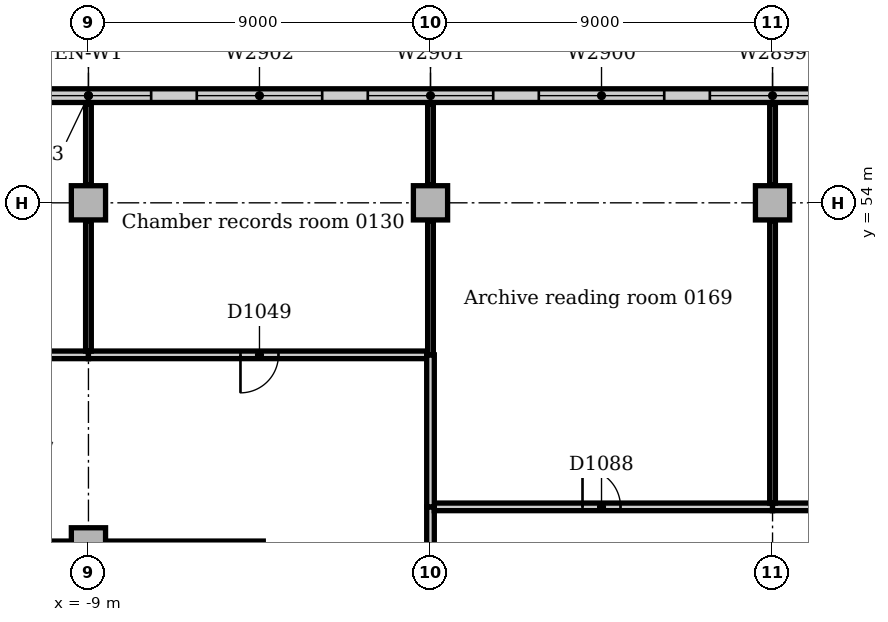
"""IFC4 building model, lengths in metres.
Left out: names, types, materials, properties, quantities, classifications, styles, units other than length and angle.
Written with IfcOpenShell. Run it as: python <this file> out.ifc"""

import sys

from ifc_helpers import new_model, si_unit, direction, frame, frame_2d, origin, origin_2d, place, context, subcontext, project, spatial, rectangle, extrude, element, fill, save


model = new_model("IFC4")
c1 = context("Model", 3, precision=1e-05, world=origin(), true_north=direction((0.0, 1.0)))
c2 = subcontext(c1, "Body", "Model", "MODEL_VIEW")
j1 = project(units=[si_unit("LENGTHUNIT", "METRE"), si_unit("PLANEANGLEUNIT", "RADIAN")], contexts=[c1])
p1 = place(None, origin())
s1 = spatial("IfcSite", under=j1, at=p1, CompositionType="ELEMENT")
p2 = place(p1, origin())
s2 = spatial("IfcBuilding", under=s1, at=p2, CompositionType="ELEMENT")
p3 = place(p2, frame((0.0, 0.0, 6.0)))
s3 = spatial("IfcBuildingStorey", under=s2, at=p3, CompositionType="ELEMENT", Elevation=6.0)
for number, where, z_axis, x_axis in (
    (1, (-9.0, 45.0, 0.0), (0.0, 0.0, 1.0), (1.0, 0.0, 0.0)),
    (2, (-9.0, 54.0, 0.0), (0.0, 0.0, 1.0), (1.0, 0.0, 0.0)),
    (3, (0.0, 54.0, 0.0), (0.0, 0.0, 1.0), (1.0, 0.0, 0.0)),
    (4, (9.0, 54.0, 0.0), (0.0, 0.0, 1.0), (1.0, 0.0, 0.0)),
):
    element("IfcColumn", number, at=place(p3, frame(where, z_axis=z_axis, x_axis=x_axis)), inside=s3, PredefinedType="COLUMN", context=c2, shape_type="SweptSolid", body=[
        extrude(rectangle(XDim=0.9, YDim=0.9, at=origin_2d()), origin(), (0.0, 0.0, 1.0), 4.7),
    ])
p4 = place(p3, frame((63.0, 56.82, 0.0), z_axis=(0.0, 0.0, 1.0), x_axis=(-1.0, 0.0, 0.0)))
e5 = element("IfcWall", 5, at=p4, inside=s3, PredefinedType="STANDARD", context=c2, shape_type="SweptSolid", body=[
    extrude(rectangle(XDim=144.0, YDim=0.36, at=frame_2d((72.0, 0.0))), origin(), (0.0, 0.0, 1.0), 4.7),
])
p5 = place(p4, frame((2.85, 0.0, 0.9)))
e6 = element("IfcOpeningElement", 6, at=p5, cuts=e5, PredefinedType="OPENING", context=c2, shape_type="SweptSolid", body=[
    extrude(rectangle(XDim=3.3, YDim=2.4, at=frame_2d((1.65, 1.2))), frame((0.0, 0.19, 0.0), z_axis=(0.0, -1.0, 0.0), x_axis=(1.0, 0.0, 0.0)), (0.0, 0.0, 1.0), 0.38),
])
p6 = place(p4, frame((7.35, 0.0, 0.9)))
e7 = element("IfcOpeningElement", 7, at=p6, cuts=e5, PredefinedType="OPENING", context=c2, shape_type="SweptSolid", body=[
    extrude(rectangle(XDim=3.3, YDim=2.4, at=frame_2d((1.65, 1.2))), frame((0.0, 0.19, 0.0), z_axis=(0.0, -1.0, 0.0), x_axis=(1.0, 0.0, 0.0)), (0.0, 0.0, 1.0), 0.38),
])
p7 = place(p4, frame((11.85, 0.0, 0.9)))
e8 = element("IfcOpeningElement", 8, at=p7, cuts=e5, PredefinedType="OPENING", context=c2, shape_type="SweptSolid", body=[
    extrude(rectangle(XDim=3.3, YDim=2.4, at=frame_2d((1.65, 1.2))), frame((0.0, 0.19, 0.0), z_axis=(0.0, -1.0, 0.0), x_axis=(1.0, 0.0, 0.0)), (0.0, 0.0, 1.0), 0.38),
])
p8 = place(p4, frame((16.35, 0.0, 0.9)))
e9 = element("IfcOpeningElement", 9, at=p8, cuts=e5, PredefinedType="OPENING", context=c2, shape_type="SweptSolid", body=[
    extrude(rectangle(XDim=3.3, YDim=2.4, at=frame_2d((1.65, 1.2))), frame((0.0, 0.19, 0.0), z_axis=(0.0, -1.0, 0.0), x_axis=(1.0, 0.0, 0.0)), (0.0, 0.0, 1.0), 0.38),
])
p9 = place(p4, frame((20.85, 0.0, 0.9)))
e10 = element("IfcOpeningElement", 10, at=p9, cuts=e5, PredefinedType="OPENING", context=c2, shape_type="SweptSolid", body=[
    extrude(rectangle(XDim=3.3, YDim=2.4, at=frame_2d((1.65, 1.2))), frame((0.0, 0.19, 0.0), z_axis=(0.0, -1.0, 0.0), x_axis=(1.0, 0.0, 0.0)), (0.0, 0.0, 1.0), 0.38),
])
p10 = place(p4, frame((25.35, 0.0, 0.9)))
e11 = element("IfcOpeningElement", 11, at=p10, cuts=e5, PredefinedType="OPENING", context=c2, shape_type="SweptSolid", body=[
    extrude(rectangle(XDim=3.3, YDim=2.4, at=frame_2d((1.65, 1.2))), frame((0.0, 0.19, 0.0), z_axis=(0.0, -1.0, 0.0), x_axis=(1.0, 0.0, 0.0)), (0.0, 0.0, 1.0), 0.38),
])
p11 = place(p4, frame((29.85, 0.0, 0.9)))
e12 = element("IfcOpeningElement", 12, at=p11, cuts=e5, PredefinedType="OPENING", context=c2, shape_type="SweptSolid", body=[
    extrude(rectangle(XDim=3.3, YDim=2.4, at=frame_2d((1.65, 1.2))), frame((0.0, 0.19, 0.0), z_axis=(0.0, -1.0, 0.0), x_axis=(1.0, 0.0, 0.0)), (0.0, 0.0, 1.0), 0.38),
])
p12 = place(p4, frame((34.35, 0.0, 0.9)))
e13 = element("IfcOpeningElement", 13, at=p12, cuts=e5, PredefinedType="OPENING", context=c2, shape_type="SweptSolid", body=[
    extrude(rectangle(XDim=3.3, YDim=2.4, at=frame_2d((1.65, 1.2))), frame((0.0, 0.19, 0.0), z_axis=(0.0, -1.0, 0.0), x_axis=(1.0, 0.0, 0.0)), (0.0, 0.0, 1.0), 0.38),
])
p13 = place(p4, frame((38.85, 0.0, 0.9)))
e14 = element("IfcOpeningElement", 14, at=p13, cuts=e5, PredefinedType="OPENING", context=c2, shape_type="SweptSolid", body=[
    extrude(rectangle(XDim=3.3, YDim=2.4, at=frame_2d((1.65, 1.2))), frame((0.0, 0.19, 0.0), z_axis=(0.0, -1.0, 0.0), x_axis=(1.0, 0.0, 0.0)), (0.0, 0.0, 1.0), 0.38),
])
p14 = place(p4, frame((43.35, 0.0, 0.9)))
e15 = element("IfcOpeningElement", 15, at=p14, cuts=e5, PredefinedType="OPENING", context=c2, shape_type="SweptSolid", body=[
    extrude(rectangle(XDim=3.3, YDim=2.4, at=frame_2d((1.65, 1.2))), frame((0.0, 0.19, 0.0), z_axis=(0.0, -1.0, 0.0), x_axis=(1.0, 0.0, 0.0)), (0.0, 0.0, 1.0), 0.38),
])
p15 = place(p4, frame((47.85, 0.0, 0.9)))
e16 = element("IfcOpeningElement", 16, at=p15, cuts=e5, PredefinedType="OPENING", context=c2, shape_type="SweptSolid", body=[
    extrude(rectangle(XDim=3.3, YDim=2.4, at=frame_2d((1.65, 1.2))), frame((0.0, 0.19, 0.0), z_axis=(0.0, -1.0, 0.0), x_axis=(1.0, 0.0, 0.0)), (0.0, 0.0, 1.0), 0.38),
])
p16 = place(p4, frame((52.35, 0.0, 0.9)))
e17 = element("IfcOpeningElement", 17, at=p16, cuts=e5, PredefinedType="OPENING", context=c2, shape_type="SweptSolid", body=[
    extrude(rectangle(XDim=3.3, YDim=2.4, at=frame_2d((1.65, 1.2))), frame((0.0, 0.19, 0.0), z_axis=(0.0, -1.0, 0.0), x_axis=(1.0, 0.0, 0.0)), (0.0, 0.0, 1.0), 0.38),
])
p17 = place(p4, frame((56.85, 0.0, 0.9)))
e18 = element("IfcOpeningElement", 18, at=p17, cuts=e5, PredefinedType="OPENING", context=c2, shape_type="SweptSolid", body=[
    extrude(rectangle(XDim=3.3, YDim=2.4, at=frame_2d((1.65, 1.2))), frame((0.0, 0.19, 0.0), z_axis=(0.0, -1.0, 0.0), x_axis=(1.0, 0.0, 0.0)), (0.0, 0.0, 1.0), 0.38),
])
p18 = place(p4, frame((61.35, 0.0, 0.9)))
e19 = element("IfcOpeningElement", 19, at=p18, cuts=e5, PredefinedType="OPENING", context=c2, shape_type="SweptSolid", body=[
    extrude(rectangle(XDim=3.3, YDim=2.4, at=frame_2d((1.65, 1.2))), frame((0.0, 0.19, 0.0), z_axis=(0.0, -1.0, 0.0), x_axis=(1.0, 0.0, 0.0)), (0.0, 0.0, 1.0), 0.38),
])
p19 = place(p4, frame((65.85, 0.0, 0.9)))
e20 = element("IfcOpeningElement", 20, at=p19, cuts=e5, PredefinedType="OPENING", context=c2, shape_type="SweptSolid", body=[
    extrude(rectangle(XDim=3.3, YDim=2.4, at=frame_2d((1.65, 1.2))), frame((0.0, 0.19, 0.0), z_axis=(0.0, -1.0, 0.0), x_axis=(1.0, 0.0, 0.0)), (0.0, 0.0, 1.0), 0.38),
])
p20 = place(p4, frame((70.35, 0.0, 0.9)))
e21 = element("IfcOpeningElement", 21, at=p20, cuts=e5, PredefinedType="OPENING", context=c2, shape_type="SweptSolid", body=[
    extrude(rectangle(XDim=3.3, YDim=2.4, at=frame_2d((1.65, 1.2))), frame((0.0, 0.19, 0.0), z_axis=(0.0, -1.0, 0.0), x_axis=(1.0, 0.0, 0.0)), (0.0, 0.0, 1.0), 0.38),
])
p21 = place(p4, frame((74.85, 0.0, 0.9)))
e22 = element("IfcOpeningElement", 22, at=p21, cuts=e5, PredefinedType="OPENING", context=c2, shape_type="SweptSolid", body=[
    extrude(rectangle(XDim=3.3, YDim=2.4, at=frame_2d((1.65, 1.2))), frame((0.0, 0.19, 0.0), z_axis=(0.0, -1.0, 0.0), x_axis=(1.0, 0.0, 0.0)), (0.0, 0.0, 1.0), 0.38),
])
p22 = place(p4, frame((79.35, 0.0, 0.9)))
e23 = element("IfcOpeningElement", 23, at=p22, cuts=e5, PredefinedType="OPENING", context=c2, shape_type="SweptSolid", body=[
    extrude(rectangle(XDim=3.3, YDim=2.4, at=frame_2d((1.65, 1.2))), frame((0.0, 0.19, 0.0), z_axis=(0.0, -1.0, 0.0), x_axis=(1.0, 0.0, 0.0)), (0.0, 0.0, 1.0), 0.38),
])
p23 = place(p4, frame((83.85, 0.0, 0.9)))
e24 = element("IfcOpeningElement", 24, at=p23, cuts=e5, PredefinedType="OPENING", context=c2, shape_type="SweptSolid", body=[
    extrude(rectangle(XDim=3.3, YDim=2.4, at=frame_2d((1.65, 1.2))), frame((0.0, 0.19, 0.0), z_axis=(0.0, -1.0, 0.0), x_axis=(1.0, 0.0, 0.0)), (0.0, 0.0, 1.0), 0.38),
])
p24 = place(p4, frame((88.35, 0.0, 0.9)))
e25 = element("IfcOpeningElement", 25, at=p24, cuts=e5, PredefinedType="OPENING", context=c2, shape_type="SweptSolid", body=[
    extrude(rectangle(XDim=3.3, YDim=2.4, at=frame_2d((1.65, 1.2))), frame((0.0, 0.19, 0.0), z_axis=(0.0, -1.0, 0.0), x_axis=(1.0, 0.0, 0.0)), (0.0, 0.0, 1.0), 0.38),
])
p25 = place(p4, frame((92.85, 0.0, 0.9)))
e26 = element("IfcOpeningElement", 26, at=p25, cuts=e5, PredefinedType="OPENING", context=c2, shape_type="SweptSolid", body=[
    extrude(rectangle(XDim=3.3, YDim=2.4, at=frame_2d((1.65, 1.2))), frame((0.0, 0.19, 0.0), z_axis=(0.0, -1.0, 0.0), x_axis=(1.0, 0.0, 0.0)), (0.0, 0.0, 1.0), 0.38),
])
p26 = place(p4, frame((97.35, 0.0, 0.9)))
e27 = element("IfcOpeningElement", 27, at=p26, cuts=e5, PredefinedType="OPENING", context=c2, shape_type="SweptSolid", body=[
    extrude(rectangle(XDim=3.3, YDim=2.4, at=frame_2d((1.65, 1.2))), frame((0.0, 0.19, 0.0), z_axis=(0.0, -1.0, 0.0), x_axis=(1.0, 0.0, 0.0)), (0.0, 0.0, 1.0), 0.38),
])
p27 = place(p4, frame((101.85, 0.0, 0.9)))
e28 = element("IfcOpeningElement", 28, at=p27, cuts=e5, PredefinedType="OPENING", context=c2, shape_type="SweptSolid", body=[
    extrude(rectangle(XDim=3.3, YDim=2.4, at=frame_2d((1.65, 1.2))), frame((0.0, 0.19, 0.0), z_axis=(0.0, -1.0, 0.0), x_axis=(1.0, 0.0, 0.0)), (0.0, 0.0, 1.0), 0.38),
])
p28 = place(p4, frame((106.35, 0.0, 0.9)))
e29 = element("IfcOpeningElement", 29, at=p28, cuts=e5, PredefinedType="OPENING", context=c2, shape_type="SweptSolid", body=[
    extrude(rectangle(XDim=3.3, YDim=2.4, at=frame_2d((1.65, 1.2))), frame((0.0, 0.19, 0.0), z_axis=(0.0, -1.0, 0.0), x_axis=(1.0, 0.0, 0.0)), (0.0, 0.0, 1.0), 0.38),
])
p29 = place(p4, frame((110.85, 0.0, 0.9)))
e30 = element("IfcOpeningElement", 30, at=p29, cuts=e5, PredefinedType="OPENING", context=c2, shape_type="SweptSolid", body=[
    extrude(rectangle(XDim=3.3, YDim=2.4, at=frame_2d((1.65, 1.2))), frame((0.0, 0.19, 0.0), z_axis=(0.0, -1.0, 0.0), x_axis=(1.0, 0.0, 0.0)), (0.0, 0.0, 1.0), 0.38),
])
p30 = place(p4, frame((115.35, 0.0, 0.9)))
e31 = element("IfcOpeningElement", 31, at=p30, cuts=e5, PredefinedType="OPENING", context=c2, shape_type="SweptSolid", body=[
    extrude(rectangle(XDim=3.3, YDim=2.4, at=frame_2d((1.65, 1.2))), frame((0.0, 0.19, 0.0), z_axis=(0.0, -1.0, 0.0), x_axis=(1.0, 0.0, 0.0)), (0.0, 0.0, 1.0), 0.38),
])
p31 = place(p4, frame((119.85, 0.0, 0.9)))
e32 = element("IfcOpeningElement", 32, at=p31, cuts=e5, PredefinedType="OPENING", context=c2, shape_type="SweptSolid", body=[
    extrude(rectangle(XDim=3.3, YDim=2.4, at=frame_2d((1.65, 1.2))), frame((0.0, 0.19, 0.0), z_axis=(0.0, -1.0, 0.0), x_axis=(1.0, 0.0, 0.0)), (0.0, 0.0, 1.0), 0.38),
])
p32 = place(p4, frame((124.35, 0.0, 0.9)))
e33 = element("IfcOpeningElement", 33, at=p32, cuts=e5, PredefinedType="OPENING", context=c2, shape_type="SweptSolid", body=[
    extrude(rectangle(XDim=3.3, YDim=2.4, at=frame_2d((1.65, 1.2))), frame((0.0, 0.19, 0.0), z_axis=(0.0, -1.0, 0.0), x_axis=(1.0, 0.0, 0.0)), (0.0, 0.0, 1.0), 0.38),
])
p33 = place(p4, frame((128.85, 0.0, 0.9)))
e34 = element("IfcOpeningElement", 34, at=p33, cuts=e5, PredefinedType="OPENING", context=c2, shape_type="SweptSolid", body=[
    extrude(rectangle(XDim=3.3, YDim=2.4, at=frame_2d((1.65, 1.2))), frame((0.0, 0.19, 0.0), z_axis=(0.0, -1.0, 0.0), x_axis=(1.0, 0.0, 0.0)), (0.0, 0.0, 1.0), 0.38),
])
p34 = place(p4, frame((133.35, 0.0, 0.9)))
e35 = element("IfcOpeningElement", 35, at=p34, cuts=e5, PredefinedType="OPENING", context=c2, shape_type="SweptSolid", body=[
    extrude(rectangle(XDim=3.3, YDim=2.4, at=frame_2d((1.65, 1.2))), frame((0.0, 0.19, 0.0), z_axis=(0.0, -1.0, 0.0), x_axis=(1.0, 0.0, 0.0)), (0.0, 0.0, 1.0), 0.38),
])
p35 = place(p4, frame((137.85, 0.0, 0.9)))
e36 = element("IfcOpeningElement", 36, at=p35, cuts=e5, PredefinedType="OPENING", context=c2, shape_type="SweptSolid", body=[
    extrude(rectangle(XDim=3.3, YDim=2.4, at=frame_2d((1.65, 1.2))), frame((0.0, 0.19, 0.0), z_axis=(0.0, -1.0, 0.0), x_axis=(1.0, 0.0, 0.0)), (0.0, 0.0, 1.0), 0.38),
])
p36 = place(p3, frame((0.0, 45.0, 0.0), z_axis=(0.0, 0.0, 1.0), x_axis=(0.0, 1.0, 0.0)))
e37 = element("IfcWall", 37, at=p36, inside=s3, PredefinedType="PARTITIONING", context=c2, shape_type="SweptSolid", body=[
    extrude(rectangle(XDim=1.0, YDim=0.2, at=frame_2d((0.5, 0.0))), origin(), (0.0, 0.0, 1.0), 4.7),
])
p37 = place(p3, frame((0.1, 46.0, 0.0), z_axis=(0.0, 0.0, 1.0), x_axis=(1.0, 0.0, 0.0)))
e38 = element("IfcWall", 38, at=p37, inside=s3, PredefinedType="PARTITIONING", context=c2, shape_type="SweptSolid", body=[
    extrude(rectangle(XDim=8.9, YDim=0.2, at=frame_2d((4.45, 0.0))), origin(), (0.0, 0.0, 1.0), 4.7),
])
p38 = place(p37, frame((3.9, 0.0, 0.0)))
e39 = element("IfcOpeningElement", 39, at=p38, cuts=e38, PredefinedType="OPENING", context=c2, shape_type="SweptSolid", body=[
    extrude(rectangle(XDim=1.0, YDim=2.1, at=frame_2d((0.5, 1.05))), frame((0.0, 0.11, 0.0), z_axis=(0.0, -1.0, 0.0), x_axis=(1.0, 0.0, 0.0)), (0.0, 0.0, 1.0), 0.22),
])
p39 = place(p3, frame((9.0, 46.0, 0.0), z_axis=(0.0, 0.0, 1.0), x_axis=(1.0, 0.0, 0.0)))
e40 = element("IfcWall", 40, at=p39, inside=s3, PredefinedType="PARTITIONING", context=c2, shape_type="SweptSolid", body=[
    extrude(rectangle(XDim=9.0, YDim=0.2, at=frame_2d((4.5, 0.0))), origin(), (0.0, 0.0, 1.0), 4.7),
])
p40 = place(p39, frame((4.0, 0.0, 0.0)))
e41 = element("IfcOpeningElement", 41, at=p40, cuts=e40, PredefinedType="OPENING", context=c2, shape_type="SweptSolid", body=[
    extrude(rectangle(XDim=1.0, YDim=2.1, at=frame_2d((0.5, 1.05))), frame((0.0, 0.11, 0.0), z_axis=(0.0, -1.0, 0.0), x_axis=(1.0, 0.0, 0.0)), (0.0, 0.0, 1.0), 0.22),
])
p41 = place(p3, frame((-8.53, 45.0, 0.0), z_axis=(0.0, 0.0, 1.0), x_axis=(1.0, 0.0, 0.0)))
e42 = element("IfcWall", 42, at=p41, inside=s3, PredefinedType="PARTITIONING", context=c2, shape_type="SweptSolid", body=[
    extrude(rectangle(XDim=4.13, YDim=0.2, at=frame_2d((2.065, 0.0))), origin(), (0.0, 0.0, 1.0), 4.7),
])
p42 = place(p3, frame((-17.53, 45.0, 0.0), z_axis=(0.0, 0.0, 1.0), x_axis=(1.0, 0.0, 0.0)))
e43 = element("IfcWall", 43, at=p42, inside=s3, PredefinedType="PARTITIONING", context=c2, shape_type="SweptSolid", body=[
    extrude(rectangle(XDim=8.06, YDim=0.2, at=frame_2d((4.03, 0.0))), origin(), (0.0, 0.0, 1.0), 4.7),
])
p43 = place(p3, frame((-18.0, 50.0, 0.0), z_axis=(0.0, 0.0, 1.0), x_axis=(1.0, 0.0, 0.0)))
e44 = element("IfcWall", 44, at=p43, inside=s3, PredefinedType="PARTITIONING", context=c2, shape_type="SweptSolid", body=[
    extrude(rectangle(XDim=9.0, YDim=0.2, at=frame_2d((4.5, 0.0))), origin(), (0.0, 0.0, 1.0), 4.7),
])
p44 = place(p43, frame((4.0, 0.0, 0.0)))
e45 = element("IfcOpeningElement", 45, at=p44, cuts=e44, PredefinedType="OPENING", context=c2, shape_type="SweptSolid", body=[
    extrude(rectangle(XDim=1.0, YDim=2.1, at=frame_2d((0.5, 1.05))), frame((0.0, 0.11, 0.0), z_axis=(0.0, -1.0, 0.0), x_axis=(1.0, 0.0, 0.0)), (0.0, 0.0, 1.0), 0.22),
])
p45 = place(p3, frame((-9.0, 50.0, 0.0), z_axis=(0.0, 0.0, 1.0), x_axis=(1.0, 0.0, 0.0)))
e46 = element("IfcWall", 46, at=p45, inside=s3, PredefinedType="PARTITIONING", context=c2, shape_type="SweptSolid", body=[
    extrude(rectangle(XDim=8.9, YDim=0.2, at=frame_2d((4.45, 0.0))), origin(), (0.0, 0.0, 1.0), 4.7),
])
p46 = place(p45, frame((4.0, 0.0, 0.0)))
e47 = element("IfcOpeningElement", 47, at=p46, cuts=e46, PredefinedType="OPENING", context=c2, shape_type="SweptSolid", body=[
    extrude(rectangle(XDim=1.0, YDim=2.1, at=frame_2d((0.5, 1.05))), frame((0.0, 0.11, 0.0), z_axis=(0.0, -1.0, 0.0), x_axis=(1.0, 0.0, 0.0)), (0.0, 0.0, 1.0), 0.22),
])
p47 = place(p3, frame((0.0, 46.0, 0.0), z_axis=(0.0, 0.0, 1.0), x_axis=(0.0, 1.0, 0.0)))
e48 = element("IfcWall", 48, at=p47, inside=s3, PredefinedType="PARTITIONING", context=c2, shape_type="SweptSolid", body=[
    extrude(rectangle(XDim=4.0, YDim=0.2, at=frame_2d((2.0, 0.0))), origin(), (0.0, 0.0, 1.0), 4.7),
])
p48 = place(p3, frame((-9.0, 50.1, 0.0), z_axis=(0.0, 0.0, 1.0), x_axis=(0.0, 1.0, 0.0)))
e49 = element("IfcWall", 49, at=p48, inside=s3, PredefinedType="PARTITIONING", context=c2, shape_type="SweptSolid", body=[
    extrude(rectangle(XDim=3.43, YDim=0.15, at=frame_2d((1.715, 0.0))), origin(), (0.0, 0.0, 1.0), 4.7),
])
p49 = place(p3, frame((-9.0, 54.47, 0.0), z_axis=(0.0, 0.0, 1.0), x_axis=(0.0, 1.0, 0.0)))
e50 = element("IfcWall", 50, at=p49, inside=s3, PredefinedType="PARTITIONING", context=c2, shape_type="SweptSolid", body=[
    extrude(rectangle(XDim=2.13, YDim=0.15, at=frame_2d((1.065, 0.0))), origin(), (0.0, 0.0, 1.0), 4.7),
])
p50 = place(p3, frame((0.0, 50.0, 0.0), z_axis=(0.0, 0.0, 1.0), x_axis=(0.0, 1.0, 0.0)))
e51 = element("IfcWall", 51, at=p50, inside=s3, PredefinedType="PARTITIONING", context=c2, shape_type="SweptSolid", body=[
    extrude(rectangle(XDim=3.53, YDim=0.15, at=frame_2d((1.765, 0.0))), origin(), (0.0, 0.0, 1.0), 4.7),
])
p51 = place(p3, frame((0.0, 54.47, 0.0), z_axis=(0.0, 0.0, 1.0), x_axis=(0.0, 1.0, 0.0)))
e52 = element("IfcWall", 52, at=p51, inside=s3, PredefinedType="PARTITIONING", context=c2, shape_type="SweptSolid", body=[
    extrude(rectangle(XDim=2.13, YDim=0.15, at=frame_2d((1.065, 0.0))), origin(), (0.0, 0.0, 1.0), 4.7),
])
p52 = place(p3, frame((9.0, 46.1, 0.0), z_axis=(0.0, 0.0, 1.0), x_axis=(0.0, 1.0, 0.0)))
e53 = element("IfcWall", 53, at=p52, inside=s3, PredefinedType="PARTITIONING", context=c2, shape_type="SweptSolid", body=[
    extrude(rectangle(XDim=7.43, YDim=0.15, at=frame_2d((3.715, 0.0))), origin(), (0.0, 0.0, 1.0), 4.7),
])
p53 = place(p3, frame((9.0, 54.47, 0.0), z_axis=(0.0, 0.0, 1.0), x_axis=(0.0, 1.0, 0.0)))
e54 = element("IfcWall", 54, at=p53, inside=s3, PredefinedType="PARTITIONING", context=c2, shape_type="SweptSolid", body=[
    extrude(rectangle(XDim=2.13, YDim=0.15, at=frame_2d((1.065, 0.0))), origin(), (0.0, 0.0, 1.0), 4.7),
])
p54 = place(p16, origin())
e55 = element("IfcWindow", 55, at=p54, inside=s3, PartitioningType="SINGLE_PANEL", PredefinedType="WINDOW", context=c2, shape_type="SweptSolid", body=[
    extrude(rectangle(XDim=3.3, YDim=2.4, at=frame_2d((1.65, 1.2))), frame((0.0, 0.13, 0.0), z_axis=(0.0, -1.0, 0.0), x_axis=(1.0, 0.0, 0.0)), (0.0, 0.0, 1.0), 0.06),
])
fill(e17, e55)
p55 = place(p17, origin())
e56 = element("IfcWindow", 56, at=p55, inside=s3, PartitioningType="SINGLE_PANEL", PredefinedType="WINDOW", context=c2, shape_type="SweptSolid", body=[
    extrude(rectangle(XDim=3.3, YDim=2.4, at=frame_2d((1.65, 1.2))), frame((0.0, 0.13, 0.0), z_axis=(0.0, -1.0, 0.0), x_axis=(1.0, 0.0, 0.0)), (0.0, 0.0, 1.0), 0.06),
])
fill(e18, e56)
p56 = place(p18, origin())
e57 = element("IfcWindow", 57, at=p56, inside=s3, PartitioningType="SINGLE_PANEL", PredefinedType="WINDOW", context=c2, shape_type="SweptSolid", body=[
    extrude(rectangle(XDim=3.3, YDim=2.4, at=frame_2d((1.65, 1.2))), frame((0.0, 0.13, 0.0), z_axis=(0.0, -1.0, 0.0), x_axis=(1.0, 0.0, 0.0)), (0.0, 0.0, 1.0), 0.06),
])
fill(e19, e57)
p57 = place(p19, origin())
e58 = element("IfcWindow", 58, at=p57, inside=s3, PartitioningType="SINGLE_PANEL", PredefinedType="WINDOW", context=c2, shape_type="SweptSolid", body=[
    extrude(rectangle(XDim=3.3, YDim=2.4, at=frame_2d((1.65, 1.2))), frame((0.0, 0.13, 0.0), z_axis=(0.0, -1.0, 0.0), x_axis=(1.0, 0.0, 0.0)), (0.0, 0.0, 1.0), 0.06),
])
fill(e20, e58)
p58 = place(p20, origin())
e59 = element("IfcWindow", 59, at=p58, inside=s3, PartitioningType="SINGLE_PANEL", PredefinedType="WINDOW", context=c2, shape_type="SweptSolid", body=[
    extrude(rectangle(XDim=3.3, YDim=2.4, at=frame_2d((1.65, 1.2))), frame((0.0, 0.13, 0.0), z_axis=(0.0, -1.0, 0.0), x_axis=(1.0, 0.0, 0.0)), (0.0, 0.0, 1.0), 0.06),
])
fill(e21, e59)
p59 = place(p46, frame((1.0, 0.0, 0.0), z_axis=(0.0, 0.0, 1.0), x_axis=(-1.0, 0.0, 0.0)))
e60 = element("IfcDoor", 60, at=p59, inside=s3, OperationType="SINGLE_SWING_RIGHT", PredefinedType="DOOR", context=c2, shape_type="SweptSolid", body=[
    extrude(rectangle(XDim=1.0, YDim=2.1, at=frame_2d((0.5, 1.05))), frame((0.0, 0.025, 0.0), z_axis=(0.0, -1.0, 0.0), x_axis=(1.0, 0.0, 0.0)), (0.0, 0.0, 1.0), 0.05),
])
fill(e47, e60)
p60 = place(p38, origin())
e61 = element("IfcDoor", 61, at=p60, inside=s3, OperationType="SINGLE_SWING_LEFT", PredefinedType="DOOR", context=c2, shape_type="SweptSolid", body=[
    extrude(rectangle(XDim=1.0, YDim=2.1, at=frame_2d((0.5, 1.05))), frame((0.0, 0.025, 0.0), z_axis=(0.0, -1.0, 0.0), x_axis=(1.0, 0.0, 0.0)), (0.0, 0.0, 1.0), 0.05),
])
fill(e39, e61)
save(model, sys.argv[1])
